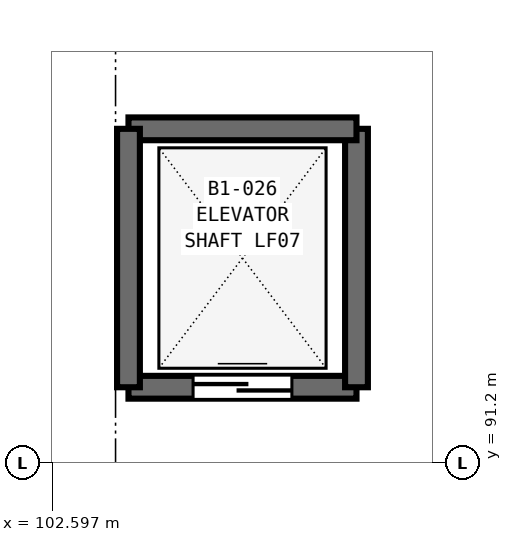
"""IFC4 building model, lengths in metres.
Left out: names, types, materials, properties, quantities, classifications, styles, units other than length and angle.
Written with IfcOpenShell. Run it as: python <this file> out.ifc"""

import sys

from ifc_helpers import new_model, si_unit, direction, frame, frame_2d, origin, place, context, subcontext, project, spatial, rectangle, extrude, element, fill, save


model = new_model("IFC4")
c1 = context("Model", 3, precision=1e-05, world=origin(), true_north=direction((0.0, 1.0)))
c2 = subcontext(c1, "Body", "Model", "MODEL_VIEW")
j1 = project(units=[si_unit("LENGTHUNIT", "METRE"), si_unit("PLANEANGLEUNIT", "RADIAN")], contexts=[c1])
p1 = place(None, origin())
s1 = spatial("IfcSite", under=j1, at=p1, CompositionType="ELEMENT")
p2 = place(p1, origin())
s2 = spatial("IfcBuilding", under=s1, at=p2, CompositionType="ELEMENT")
p3 = place(p2, frame((0.0, 0.0, -4.8)))
s3 = spatial("IfcBuildingStorey", under=s2, at=p3, CompositionType="ELEMENT", Elevation=-4.8)
p4 = place(p3, frame((103.6, 92.2, 0.0), z_axis=(0.0, 0.0, 1.0), x_axis=(1.0, 0.0, 0.0)))
e1 = element("IfcWall", 1, at=p4, inside=s3, PredefinedType="SHEAR", context=c2, shape_type="SweptSolid", body=[
    extrude(rectangle(XDim=3.0, YDim=0.3, at=frame_2d((1.5, 0.0))), origin(), (0.0, 0.0, 1.0), 4.8),
])
p5 = place(p4, frame((0.85, 0.0, 0.0)))
e2 = element("IfcOpeningElement", 2, at=p5, cuts=e1, PredefinedType="OPENING", context=c2, shape_type="SweptSolid", body=[
    extrude(rectangle(XDim=1.3, YDim=2.2, at=frame_2d((0.65, 1.1))), frame((0.0, 0.16, 0.0), z_axis=(0.0, -1.0, 0.0), x_axis=(1.0, 0.0, 0.0)), (0.0, 0.0, 1.0), 0.32),
])
p6 = place(p3, frame((106.6, 92.2, 0.0), z_axis=(0.0, 0.0, 1.0), x_axis=(0.0, 1.0, 0.0)))
e3 = element("IfcWall", 3, at=p6, inside=s3, PredefinedType="SHEAR", context=c2, shape_type="SweptSolid", body=[
    extrude(rectangle(XDim=3.4, YDim=0.3, at=frame_2d((1.7, 0.0))), origin(), (0.0, 0.0, 1.0), 4.8),
])
p7 = place(p3, frame((106.6, 95.6, 0.0), z_axis=(0.0, 0.0, 1.0), x_axis=(-1.0, 0.0, 0.0)))
e4 = element("IfcWall", 4, at=p7, inside=s3, PredefinedType="SHEAR", context=c2, shape_type="SweptSolid", body=[
    extrude(rectangle(XDim=3.0, YDim=0.3, at=frame_2d((1.5, 0.0))), origin(), (0.0, 0.0, 1.0), 4.8),
])
p8 = place(p3, frame((103.6, 95.6, 0.0), z_axis=(0.0, 0.0, 1.0), x_axis=(0.0, -1.0, 0.0)))
e5 = element("IfcWall", 5, at=p8, inside=s3, PredefinedType="SHEAR", context=c2, shape_type="SweptSolid", body=[
    extrude(rectangle(XDim=3.4, YDim=0.3, at=frame_2d((1.7, 0.0))), origin(), (0.0, 0.0, 1.0), 4.8),
])
p9 = place(p5, origin())
e6 = element("IfcDoor", 6, at=p9, inside=s3, OperationType="DOUBLE_DOOR_SLIDING", PredefinedType="DOOR", context=c2, shape_type="SweptSolid", body=[
    extrude(rectangle(XDim=1.3, YDim=2.2, at=frame_2d((0.65, 1.1))), frame((0.0, 0.025, 0.0), z_axis=(0.0, -1.0, 0.0), x_axis=(1.0, 0.0, 0.0)), (0.0, 0.0, 1.0), 0.05),
])
fill(e2, e6)
save(model, sys.argv[1])
